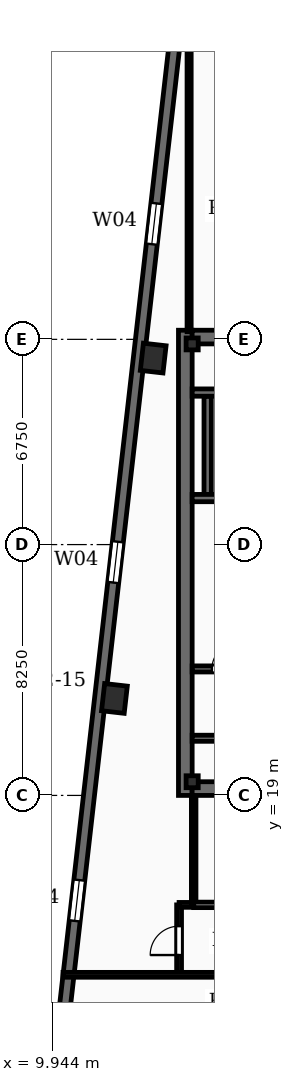
"""IFC4 building model, lengths in metres.
Left out: names, types, materials, properties, quantities, classifications, styles, units other than length and angle.
Written with IfcOpenShell. Run it as: python <this file> out.ifc"""

import sys

from ifc_helpers import new_model, si_unit, direction, frame, frame_2d, origin, origin_2d, place, context, subcontext, project, spatial, rectangle, i_section, extrude, element, fill, save


model = new_model("IFC4")
c1 = context("Model", 3, precision=1e-05, world=origin(), true_north=direction((0.0, 1.0)))
c2 = subcontext(c1, "Body", "Model", "MODEL_VIEW")
j1 = project(units=[si_unit("LENGTHUNIT", "METRE"), si_unit("PLANEANGLEUNIT", "RADIAN")], contexts=[c1])
p1 = place(None, origin())
s1 = spatial("IfcSite", under=j1, at=p1, CompositionType="ELEMENT")
p2 = place(p1, origin())
s2 = spatial("IfcBuilding", under=s1, at=p2, CompositionType="ELEMENT")
p3 = place(p2, frame((0.0, 0.0, 262.2)))
s3 = spatial("IfcBuildingStorey", under=s2, at=p3, CompositionType="ELEMENT", Elevation=262.2)
p4 = place(p3, frame((14.325, 19.0, -0.27), z_axis=(0.0, 0.0, 1.0), x_axis=(0.0, 1.0, 0.0)))
e1 = element("IfcWall", 1, at=p4, inside=s3, PredefinedType="SHEAR", context=c2, shape_type="SweptSolid", body=[
    extrude(rectangle(XDim=15.3, YDim=0.45, at=frame_2d((7.65, 0.0))), origin(), (0.0, 0.0, 1.0), 3.75),
])
for number, where, z_axis, x_axis in (
    (2, (14.55, 19.225, -0.27), (0.0, 0.0, 1.0), (1.0, 0.0, 0.0)),
    (3, (14.55, 34.075, -0.27), (0.0, 0.0, 1.0), (1.0, 0.0, 0.0)),
):
    element("IfcWall", number, at=place(p3, frame(where, z_axis=z_axis, x_axis=x_axis)), inside=s3, PredefinedType="SHEAR", context=c2, shape_type="SweptSolid", body=[
        extrude(rectangle(XDim=9.8, YDim=0.45, at=frame_2d((4.9, 0.0))), origin(), (0.0, 0.0, 1.0), 3.75),
    ])
for number, where, z_axis, x_axis in (
    (4, (14.55, 19.45, -0.27), (0.0, 0.0, 1.0), (1.0, 0.0, 0.0)),
    (5, (14.55, 33.85, -0.27), (0.0, 0.0, 1.0), (1.0, 0.0, 0.0)),
):
    element("IfcColumn", number, at=place(p3, frame(where, z_axis=z_axis, x_axis=x_axis)), inside=s3, PredefinedType="COLUMN", context=c2, shape_type="SweptSolid", body=[
        extrude(i_section(OverallWidth=0.399, OverallDepth=0.393, WebThickness=0.023, FlangeThickness=0.037, FilletRadius=0.02, at=origin_2d()), origin(), (0.0, 0.0, 1.0), 3.75),
    ])
for number, where, z_axis, x_axis in (
    (6, (13.269, 33.384, -0.27), (0.0, 0.0, 1.0), (0.113, 0.994, 0.0)),
    (7, (11.993, 22.189, -0.27), (0.0, 0.0, 1.0), (0.113, 0.994, 0.0)),
):
    element("IfcColumn", number, at=place(p3, frame(where, z_axis=z_axis, x_axis=x_axis)), inside=s3, PredefinedType="COLUMN", context=c2, shape_type="SweptSolid", body=[
        extrude(rectangle(XDim=0.9, YDim=0.75, at=origin_2d()), origin(), (0.0, 0.0, 1.0), 3.75),
    ])
p5 = place(p3, frame((10.211, 10.701, 0.0), z_axis=(0.0, 0.0, 1.0), x_axis=(0.113203107947, 0.993571867733, 0.0)))
e8 = element("IfcWall", 8, at=p5, inside=s3, PredefinedType="SOLIDWALL", context=c2, shape_type="SweptSolid", body=[
    extrude(rectangle(XDim=34.5, YDim=0.36, at=frame_2d((17.25, 0.0))), origin(), (0.0, 0.0, 1.0), 3.48),
])
p6 = place(p5, frame((4.2, 0.0, 0.88)))
e9 = element("IfcOpeningElement", 9, at=p6, cuts=e8, PredefinedType="OPENING", context=c2, shape_type="SweptSolid", body=[
    extrude(rectangle(XDim=1.35, YDim=2.2, at=frame_2d((0.675, 1.1))), frame((0.0, 0.19, 0.0), z_axis=(0.0, -1.0, 0.0), x_axis=(1.0, 0.0, 0.0)), (0.0, 0.0, 1.0), 0.38),
])
p7 = place(p5, frame((15.4, 0.0, 0.88)))
e10 = element("IfcOpeningElement", 10, at=p7, cuts=e8, PredefinedType="OPENING", context=c2, shape_type="SweptSolid", body=[
    extrude(rectangle(XDim=1.35, YDim=2.2, at=frame_2d((0.675, 1.1))), frame((0.0, 0.19, 0.0), z_axis=(0.0, -1.0, 0.0), x_axis=(1.0, 0.0, 0.0)), (0.0, 0.0, 1.0), 0.38),
])
p8 = place(p5, frame((26.6, 0.0, 0.88)))
e11 = element("IfcOpeningElement", 11, at=p8, cuts=e8, PredefinedType="OPENING", context=c2, shape_type="SweptSolid", body=[
    extrude(rectangle(XDim=1.35, YDim=2.2, at=frame_2d((0.675, 1.1))), frame((0.0, 0.19, 0.0), z_axis=(0.0, -1.0, 0.0), x_axis=(1.0, 0.0, 0.0)), (0.0, 0.0, 1.0), 0.38),
])
p9 = place(p3, frame((24.35, 28.78, 0.0), z_axis=(0.0, 0.0, 1.0), x_axis=(-1.0, 0.0, 0.0)))
e12 = element("IfcWall", 12, at=p9, inside=s3, PredefinedType="SOLIDWALL", context=c2, shape_type="SweptSolid", body=[
    extrude(rectangle(XDim=9.8, YDim=0.24, at=frame_2d((4.9, 0.0))), origin(), (0.0, 0.0, 1.0), 3.48),
])
p10 = place(p9, frame((7.83, 0.0, 0.0)))
e13 = element("IfcOpeningElement", 13, at=p10, cuts=e12, PredefinedType="OPENING", context=c2, shape_type="SweptSolid", body=[
    extrude(rectangle(XDim=1.1, YDim=2.15, at=frame_2d((0.55, 1.075))), frame((0.0, 0.13, 0.0), z_axis=(0.0, -1.0, 0.0), x_axis=(1.0, 0.0, 0.0)), (0.0, 0.0, 1.0), 0.26),
])
p11 = place(p3, frame((14.55, 32.25, 0.0), z_axis=(0.0, 0.0, 1.0), x_axis=(1.0, 0.0, 0.0)))
e14 = element("IfcWall", 14, at=p11, inside=s3, PredefinedType="SOLIDWALL", context=c2, shape_type="SweptSolid", body=[
    extrude(rectangle(XDim=9.8, YDim=0.24, at=frame_2d((4.9, 0.0))), origin(), (0.0, 0.0, 1.0), 3.48),
])
p12 = place(p3, frame((15.06, 28.9, 0.0), z_axis=(0.0, 0.0, 1.0), x_axis=(0.0, 1.0, 0.0)))
e15 = element("IfcWall", 15, at=p12, inside=s3, PredefinedType="SOLIDWALL", context=c2, shape_type="SweptSolid", body=[
    extrude(rectangle(XDim=3.23, YDim=0.24, at=frame_2d((1.615, 0.0))), origin(), (0.0, 0.0, 1.0), 3.48),
])
p13 = place(p3, frame((14.55, 20.88, 0.0), z_axis=(0.0, 0.0, 1.0), x_axis=(1.0, 0.0, 0.0)))
e16 = element("IfcWall", 16, at=p13, inside=s3, PredefinedType="SOLIDWALL", context=c2, shape_type="SweptSolid", body=[
    extrude(rectangle(XDim=9.8, YDim=0.2, at=frame_2d((4.9, 0.0))), origin(), (0.0, 0.0, 1.0), 2.54),
])
p14 = place(p13, frame((3.4, 0.0, 0.0)))
e17 = element("IfcOpeningElement", 17, at=p14, cuts=e16, PredefinedType="OPENING", context=c2, shape_type="SweptSolid", body=[
    extrude(rectangle(XDim=1.05, YDim=2.15, at=frame_2d((0.525, 1.075))), frame((0.0, 0.11, 0.0), z_axis=(0.0, -1.0, 0.0), x_axis=(1.0, 0.0, 0.0)), (0.0, 0.0, 1.0), 0.22),
])
p15 = place(p3, frame((14.55, 23.16, 0.0), z_axis=(0.0, 0.0, 1.0), x_axis=(1.0, 0.0, 0.0)))
e18 = element("IfcWall", 18, at=p15, inside=s3, PredefinedType="SOLIDWALL", context=c2, shape_type="SweptSolid", body=[
    extrude(rectangle(XDim=3.82, YDim=0.2, at=frame_2d((1.91, 0.0))), origin(), (0.0, 0.0, 1.0), 2.54),
])
p16 = place(p15, frame((0.65, 0.0, 0.0)))
e19 = element("IfcOpeningElement", 19, at=p16, cuts=e18, PredefinedType="OPENING", context=c2, shape_type="SweptSolid", body=[
    extrude(rectangle(XDim=0.86, YDim=2.05, at=frame_2d((0.43, 1.025))), frame((0.0, 0.11, 0.0), z_axis=(0.0, -1.0, 0.0), x_axis=(1.0, 0.0, 0.0)), (0.0, 0.0, 1.0), 0.22),
])
p17 = place(p3, frame((14.6, 15.4, 0.0), z_axis=(0.0, 0.0, 1.0), x_axis=(1.0, 0.0, 0.0)))
e20 = element("IfcWall", 20, at=p17, inside=s3, PredefinedType="PARTITIONING", context=c2, shape_type="SweptSolid", body=[
    extrude(rectangle(XDim=9.9, YDim=0.18, at=frame_2d((4.95, 0.0))), origin(), (0.0, 0.0, 1.0), 2.54),
])
p18 = place(p17, frame((1.99, 0.0, 0.0)))
e21 = element("IfcOpeningElement", 21, at=p18, cuts=e20, PredefinedType="OPENING", context=c2, shape_type="SweptSolid", body=[
    extrude(rectangle(XDim=0.92, YDim=2.1, at=frame_2d((0.46, 1.05))), frame((0.0, 0.1, 0.0), z_axis=(0.0, -1.0, 0.0), x_axis=(1.0, 0.0, 0.0)), (0.0, 0.0, 1.0), 0.2),
])
p19 = place(p17, frame((6.94, 0.0, 0.0)))
e22 = element("IfcOpeningElement", 22, at=p19, cuts=e20, PredefinedType="OPENING", context=c2, shape_type="SweptSolid", body=[
    extrude(rectangle(XDim=0.92, YDim=2.1, at=frame_2d((0.46, 1.05))), frame((0.0, 0.1, 0.0), z_axis=(0.0, -1.0, 0.0), x_axis=(1.0, 0.0, 0.0)), (0.0, 0.0, 1.0), 0.2),
])
p20 = place(p3, frame((14.6, 15.4, 0.0), z_axis=(0.0, 0.0, 1.0), x_axis=(0.0, 1.0, 0.0)))
e23 = element("IfcWall", 23, at=p20, inside=s3, PredefinedType="PARTITIONING", context=c2, shape_type="SweptSolid", body=[
    extrude(rectangle(XDim=3.58, YDim=0.15, at=frame_2d((1.79, 0.0))), origin(), (0.0, 0.0, 1.0), 2.54),
])
p21 = place(p3, frame((10.303, 13.1, 0.0), z_axis=(0.0, 0.0, 1.0), x_axis=(1.0, 0.0, 0.0)))
e24 = element("IfcWall", 24, at=p21, inside=s3, PredefinedType="PARTITIONING", context=c2, shape_type="SweptSolid", body=[
    extrude(rectangle(XDim=57.973, YDim=0.16, at=frame_2d((28.986, 0.0))), origin(), (0.0, 0.0, 1.0), 2.54),
])
p22 = place(p21, frame((11.722, 0.0, 0.0)))
e25 = element("IfcOpeningElement", 25, at=p22, cuts=e24, PredefinedType="OPENING", context=c2, shape_type="SweptSolid", body=[
    extrude(rectangle(XDim=0.95, YDim=2.15, at=frame_2d((0.475, 1.075))), frame((0.0, 0.09, 0.0), z_axis=(0.0, -1.0, 0.0), x_axis=(1.0, 0.0, 0.0)), (0.0, 0.0, 1.0), 0.18),
])
p23 = place(p21, frame((28.222, 0.0, 0.0)))
e26 = element("IfcOpeningElement", 26, at=p23, cuts=e24, PredefinedType="OPENING", context=c2, shape_type="SweptSolid", body=[
    extrude(rectangle(XDim=0.95, YDim=2.15, at=frame_2d((0.475, 1.075))), frame((0.0, 0.09, 0.0), z_axis=(0.0, -1.0, 0.0), x_axis=(1.0, 0.0, 0.0)), (0.0, 0.0, 1.0), 0.18),
])
p24 = place(p21, frame((37.922, 0.0, 0.0)))
e27 = element("IfcOpeningElement", 27, at=p24, cuts=e24, PredefinedType="OPENING", context=c2, shape_type="SweptSolid", body=[
    extrude(rectangle(XDim=0.95, YDim=2.15, at=frame_2d((0.475, 1.075))), frame((0.0, 0.09, 0.0), z_axis=(0.0, -1.0, 0.0), x_axis=(1.0, 0.0, 0.0)), (0.0, 0.0, 1.0), 0.18),
])
p25 = place(p3, frame((14.45, 34.25, 0.0), z_axis=(0.0, 0.0, 1.0), x_axis=(0.0, 1.0, 0.0)))
e28 = element("IfcWall", 28, at=p25, inside=s3, PredefinedType="PARTITIONING", context=c2, shape_type="SweptSolid", body=[
    extrude(rectangle(XDim=11.562, YDim=0.135, at=frame_2d((5.781, 0.0))), origin(), (0.0, 0.0, 1.0), 2.54),
])
p26 = place(p3, frame((14.12, 13.1, 0.0), z_axis=(0.0, 0.0, 1.0), x_axis=(0.0, 1.0, 0.0)))
e29 = element("IfcWall", 29, at=p26, inside=s3, PredefinedType="PARTITIONING", context=c2, shape_type="SweptSolid", body=[
    extrude(rectangle(XDim=2.3, YDim=0.16, at=frame_2d((1.15, 0.0))), origin(), (0.0, 0.0, 1.0), 2.54),
])
p27 = place(p26, frame((0.65, 0.0, 0.0)))
e30 = element("IfcOpeningElement", 30, at=p27, cuts=e29, PredefinedType="OPENING", context=c2, shape_type="SweptSolid", body=[
    extrude(rectangle(XDim=0.95, YDim=2.15, at=frame_2d((0.475, 1.075))), frame((0.0, 0.09, 0.0), z_axis=(0.0, -1.0, 0.0), x_axis=(1.0, 0.0, 0.0)), (0.0, 0.0, 1.0), 0.18),
])
p28 = place(p3, frame((14.12, 15.4, 0.0), z_axis=(0.0, 0.0, 1.0), x_axis=(1.0, 0.0, 0.0)))
e31 = element("IfcWall", 31, at=p28, inside=s3, PredefinedType="PARTITIONING", context=c2, shape_type="SweptSolid", body=[
    extrude(rectangle(XDim=0.5, YDim=0.16, at=frame_2d((0.25, 0.0))), origin(), (0.0, 0.0, 1.0), 2.54),
])
p29 = place(p6, origin())
e32 = element("IfcWindow", 32, at=p29, inside=s3, PartitioningType="SINGLE_PANEL", PredefinedType="WINDOW", context=c2, shape_type="SweptSolid", body=[
    extrude(rectangle(XDim=1.35, YDim=2.2, at=frame_2d((0.675, 1.1))), frame((0.0, 0.03, 0.0), z_axis=(0.0, -1.0, 0.0), x_axis=(1.0, 0.0, 0.0)), (0.0, 0.0, 1.0), 0.06),
])
fill(e9, e32)
p30 = place(p7, origin())
e33 = element("IfcWindow", 33, at=p30, inside=s3, PartitioningType="SINGLE_PANEL", PredefinedType="WINDOW", context=c2, shape_type="SweptSolid", body=[
    extrude(rectangle(XDim=1.35, YDim=2.2, at=frame_2d((0.675, 1.1))), frame((0.0, 0.03, 0.0), z_axis=(0.0, -1.0, 0.0), x_axis=(1.0, 0.0, 0.0)), (0.0, 0.0, 1.0), 0.06),
])
fill(e10, e33)
p31 = place(p8, origin())
e34 = element("IfcWindow", 34, at=p31, inside=s3, PartitioningType="SINGLE_PANEL", PredefinedType="WINDOW", context=c2, shape_type="SweptSolid", body=[
    extrude(rectangle(XDim=1.35, YDim=2.2, at=frame_2d((0.675, 1.1))), frame((0.0, 0.03, 0.0), z_axis=(0.0, -1.0, 0.0), x_axis=(1.0, 0.0, 0.0)), (0.0, 0.0, 1.0), 0.06),
])
fill(e11, e34)
p32 = place(p16, origin())
e35 = element("IfcDoor", 35, at=p32, inside=s3, OperationType="SINGLE_SWING_RIGHT", PredefinedType="DOOR", context=c2, shape_type="SweptSolid", body=[
    extrude(rectangle(XDim=0.86, YDim=2.05, at=frame_2d((0.43, 1.025))), frame((0.0, 0.025, 0.0), z_axis=(0.0, -1.0, 0.0), x_axis=(1.0, 0.0, 0.0)), (0.0, 0.0, 1.0), 0.05),
])
fill(e19, e35)
p33 = place(p27, origin())
e36 = element("IfcDoor", 36, at=p33, inside=s3, OperationType="SINGLE_SWING_LEFT", PredefinedType="DOOR", context=c2, shape_type="SweptSolid", body=[
    extrude(rectangle(XDim=0.95, YDim=2.15, at=frame_2d((0.475, 1.075))), frame((0.0, 0.025, 0.0), z_axis=(0.0, -1.0, 0.0), x_axis=(1.0, 0.0, 0.0)), (0.0, 0.0, 1.0), 0.05),
])
fill(e30, e36)
save(model, sys.argv[1])
